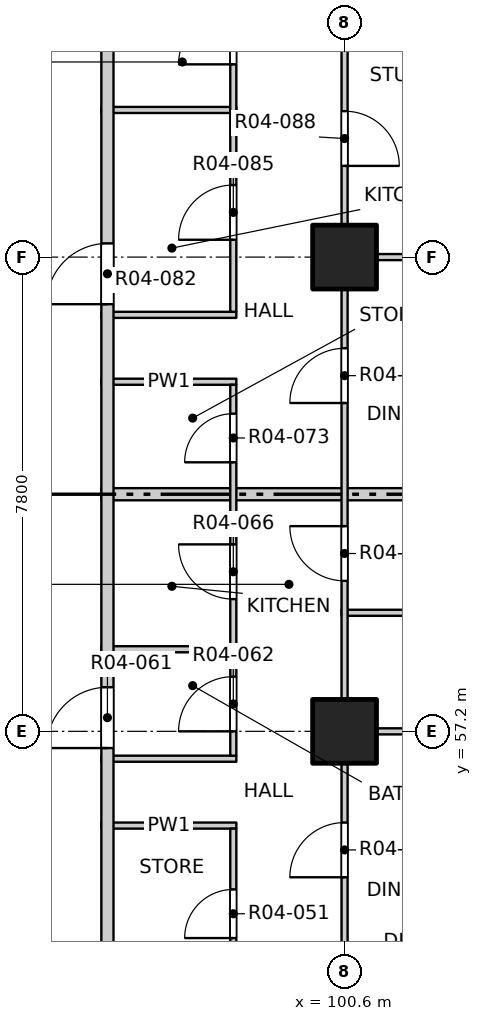
"""IFC4 building model, lengths in metres.
Left out: names, types, materials, properties, quantities, classifications, styles, units other than length and angle.
Written with IfcOpenShell. Run it as: python <this file> out.ifc"""

import sys

from ifc_helpers import new_model, si_unit, direction, frame, frame_2d, origin, origin_2d, place, context, subcontext, project, spatial, rectangle, extrude, element, fill, save


model = new_model("IFC4")
c1 = context("Model", 3, precision=1e-05, world=origin(), true_north=direction((0.0, 1.0)))
c2 = subcontext(c1, "Body", "Model", "MODEL_VIEW")
j1 = project(units=[si_unit("LENGTHUNIT", "METRE"), si_unit("PLANEANGLEUNIT", "RADIAN")], contexts=[c1])
p1 = place(None, origin())
s1 = spatial("IfcSite", under=j1, at=p1, CompositionType="ELEMENT")
p2 = place(p1, origin())
s2 = spatial("IfcBuilding", under=s1, at=p2, CompositionType="ELEMENT")
p3 = place(p2, frame((0.0, 0.0, 58.0)))
s3 = spatial("IfcBuildingStorey", under=s2, at=p3, CompositionType="ELEMENT", Elevation=58.0)
for number, where, z_axis, x_axis in (
    (1, (100.6, 57.2, -0.25), (0.0, 0.0, 1.0), (1.0, 0.0, 0.0)),
    (2, (100.6, 65.0, -0.25), (0.0, 0.0, 1.0), (1.0, 0.0, 0.0)),
):
    element("IfcColumn", number, at=place(p3, frame(where, z_axis=z_axis, x_axis=x_axis)), inside=s3, PredefinedType="COLUMN", context=c2, shape_type="SweptSolid", body=[
        extrude(rectangle(XDim=1.05, YDim=1.05, at=origin_2d()), origin(), (0.0, 0.0, 1.0), 3.4),
    ])
for number, where, z_axis, x_axis in (
    (3, (96.6, 55.65, 0.0), (0.0, 0.0, 1.0), (1.0, 0.0, 0.0)),
    (4, (96.6, 56.75, 0.0), (0.0, 0.0, 1.0), (1.0, 0.0, 0.0)),
):
    element("IfcWall", number, at=place(p3, frame(where, z_axis=z_axis, x_axis=x_axis)), inside=s3, PredefinedType="PARTITIONING", context=c2, shape_type="SweptSolid", body=[
        extrude(rectangle(XDim=2.22, YDim=0.1, at=frame_2d((1.11, 0.0))), origin(), (0.0, 0.0, 1.0), 3.15),
    ])
p4 = place(p3, frame((100.55, 57.2, 0.0), z_axis=(0.0, 0.0, 1.0), x_axis=(1.0, 0.0, 0.0)))
e5 = element("IfcWall", 5, at=p4, inside=s3, PredefinedType="PARTITIONING", context=c2, shape_type="SweptSolid", body=[
    extrude(rectangle(XDim=7.55, YDim=0.1, at=frame_2d((3.775, 0.0))), origin(), (0.0, 0.0, 1.0), 2.55),
])
p5 = place(p3, frame((96.6, 58.55, 0.0), z_axis=(0.0, 0.0, 1.0), x_axis=(1.0, 0.0, 0.0)))
e6 = element("IfcWall", 6, at=p5, inside=s3, PredefinedType="PARTITIONING", context=c2, shape_type="SweptSolid", body=[
    extrude(rectangle(XDim=2.22, YDim=0.1, at=frame_2d((1.11, 0.0))), origin(), (0.0, 0.0, 1.0), 3.15),
])
p6 = place(p3, frame((100.55, 59.15, 0.0), z_axis=(0.0, 0.0, 1.0), x_axis=(1.0, 0.0, 0.0)))
e7 = element("IfcWall", 7, at=p6, inside=s3, PredefinedType="PARTITIONING", context=c2, shape_type="SweptSolid", body=[
    extrude(rectangle(XDim=3.7, YDim=0.1, at=frame_2d((1.85, 0.0))), origin(), (0.0, 0.0, 1.0), 3.15),
])
p7 = place(p3, frame((96.6, 61.1, 0.0), z_axis=(0.0, 0.0, 1.0), x_axis=(1.0, 0.0, 0.0)))
e8 = element("IfcWall", 8, at=p7, inside=s3, PredefinedType="PARTITIONING", context=c2, shape_type="SweptSolid", body=[
    extrude(rectangle(XDim=11.5, YDim=0.2, at=frame_2d((5.75, 0.0))), origin(), (0.0, 0.0, 1.0), 3.15),
])
for number, where, z_axis, x_axis in (
    (9, (96.6, 62.95, 0.0), (0.0, 0.0, 1.0), (1.0, 0.0, 0.0)),
    (10, (96.6, 64.05, 0.0), (0.0, 0.0, 1.0), (1.0, 0.0, 0.0)),
):
    element("IfcWall", number, at=place(p3, frame(where, z_axis=z_axis, x_axis=x_axis)), inside=s3, PredefinedType="PARTITIONING", context=c2, shape_type="SweptSolid", body=[
        extrude(rectangle(XDim=2.22, YDim=0.1, at=frame_2d((1.11, 0.0))), origin(), (0.0, 0.0, 1.0), 3.15),
    ])
p8 = place(p3, frame((100.55, 65.0, 0.0), z_axis=(0.0, 0.0, 1.0), x_axis=(1.0, 0.0, 0.0)))
e11 = element("IfcWall", 11, at=p8, inside=s3, PredefinedType="PARTITIONING", context=c2, shape_type="SweptSolid", body=[
    extrude(rectangle(XDim=7.55, YDim=0.1, at=frame_2d((3.775, 0.0))), origin(), (0.0, 0.0, 1.0), 2.55),
])
p9 = place(p3, frame((96.6, 67.42, 0.0), z_axis=(0.0, 0.0, 1.0), x_axis=(1.0, 0.0, 0.0)))
e12 = element("IfcWall", 12, at=p9, inside=s3, PredefinedType="PARTITIONING", context=c2, shape_type="SweptSolid", body=[
    extrude(rectangle(XDim=2.22, YDim=0.1, at=frame_2d((1.11, 0.0))), origin(), (0.0, 0.0, 1.0), 3.15),
])
p10 = place(p3, frame((96.7, 53.4, 0.0), z_axis=(0.0, 0.0, 1.0), x_axis=(0.0, 1.0, 0.0)))
e13 = element("IfcWall", 13, at=p10, inside=s3, PredefinedType="PARTITIONING", context=c2, shape_type="SweptSolid", body=[
    extrude(rectangle(XDim=31.0, YDim=0.2, at=frame_2d((15.5, 0.0))), origin(), (0.0, 0.0, 1.0), 3.15),
])
p11 = place(p10, frame((3.525, 0.0, 0.0)))
e14 = element("IfcOpeningElement", 14, at=p11, cuts=e13, PredefinedType="OPENING", context=c2, shape_type="SweptSolid", body=[
    extrude(rectangle(XDim=1.0, YDim=2.1, at=frame_2d((0.5, 1.05))), frame((0.0, 0.11, 0.0), z_axis=(0.0, -1.0, 0.0), x_axis=(1.0, 0.0, 0.0)), (0.0, 0.0, 1.0), 0.22),
])
p12 = place(p10, frame((10.825, 0.0, 0.0)))
e15 = element("IfcOpeningElement", 15, at=p12, cuts=e13, PredefinedType="OPENING", context=c2, shape_type="SweptSolid", body=[
    extrude(rectangle(XDim=1.0, YDim=2.1, at=frame_2d((0.5, 1.05))), frame((0.0, 0.11, 0.0), z_axis=(0.0, -1.0, 0.0), x_axis=(1.0, 0.0, 0.0)), (0.0, 0.0, 1.0), 0.22),
])
p13 = place(p10, frame((25.975, 0.0, 0.0)))
e16 = element("IfcOpeningElement", 16, at=p13, cuts=e13, PredefinedType="OPENING", context=c2, shape_type="SweptSolid", body=[
    extrude(rectangle(XDim=1.0, YDim=2.1, at=frame_2d((0.5, 1.05))), frame((0.0, 0.11, 0.0), z_axis=(0.0, -1.0, 0.0), x_axis=(1.0, 0.0, 0.0)), (0.0, 0.0, 1.0), 0.22),
])
p14 = place(p3, frame((98.77, 45.55, 0.0), z_axis=(0.0, 0.0, 1.0), x_axis=(0.0, 1.0, 0.0)))
e17 = element("IfcWall", 17, at=p14, inside=s3, PredefinedType="PARTITIONING", context=c2, shape_type="SweptSolid", body=[
    extrude(rectangle(XDim=10.05, YDim=0.1, at=frame_2d((5.025, 0.0))), origin(), (0.0, 0.0, 1.0), 3.15),
])
p15 = place(p14, frame((0.4, 0.0, 0.0)))
e18 = element("IfcOpeningElement", 18, at=p15, cuts=e17, PredefinedType="OPENING", context=c2, shape_type="SweptSolid", body=[
    extrude(rectangle(XDim=0.9, YDim=2.1, at=frame_2d((0.45, 1.05))), frame((0.0, 0.06, 0.0), z_axis=(0.0, -1.0, 0.0), x_axis=(1.0, 0.0, 0.0)), (0.0, 0.0, 1.0), 0.12),
])
p16 = place(p14, frame((2.8, 0.0, 0.0)))
e19 = element("IfcOpeningElement", 19, at=p16, cuts=e17, PredefinedType="OPENING", context=c2, shape_type="SweptSolid", body=[
    extrude(rectangle(XDim=0.8, YDim=2.1, at=frame_2d((0.4, 1.05))), frame((0.0, 0.06, 0.0), z_axis=(0.0, -1.0, 0.0), x_axis=(1.0, 0.0, 0.0)), (0.0, 0.0, 1.0), 0.12),
])
p17 = place(p14, frame((5.525, 0.0, 0.0)))
e20 = element("IfcOpeningElement", 20, at=p17, cuts=e17, PredefinedType="OPENING", context=c2, shape_type="SweptSolid", body=[
    extrude(rectangle(XDim=0.8, YDim=2.1, at=frame_2d((0.4, 1.05))), frame((0.0, 0.06, 0.0), z_axis=(0.0, -1.0, 0.0), x_axis=(1.0, 0.0, 0.0)), (0.0, 0.0, 1.0), 0.12),
])
p18 = place(p14, frame((8.25, 0.0, 0.0)))
e21 = element("IfcOpeningElement", 21, at=p18, cuts=e17, PredefinedType="OPENING", context=c2, shape_type="SweptSolid", body=[
    extrude(rectangle(XDim=0.8, YDim=2.1, at=frame_2d((0.4, 1.05))), frame((0.0, 0.06, 0.0), z_axis=(0.0, -1.0, 0.0), x_axis=(1.0, 0.0, 0.0)), (0.0, 0.0, 1.0), 0.12),
])
p19 = place(p3, frame((98.77, 56.8, 0.0), z_axis=(0.0, 0.0, 1.0), x_axis=(0.0, 1.0, 0.0)))
e22 = element("IfcWall", 22, at=p19, inside=s3, PredefinedType="PARTITIONING", context=c2, shape_type="SweptSolid", body=[
    extrude(rectangle(XDim=6.1, YDim=0.1, at=frame_2d((3.05, 0.0))), origin(), (0.0, 0.0, 1.0), 3.15),
])
p20 = place(p19, frame((0.4, 0.0, 0.0)))
e23 = element("IfcOpeningElement", 23, at=p20, cuts=e22, PredefinedType="OPENING", context=c2, shape_type="SweptSolid", body=[
    extrude(rectangle(XDim=0.9, YDim=2.1, at=frame_2d((0.45, 1.05))), frame((0.0, 0.06, 0.0), z_axis=(0.0, -1.0, 0.0), x_axis=(1.0, 0.0, 0.0)), (0.0, 0.0, 1.0), 0.12),
])
p21 = place(p19, frame((2.575, 0.0, 0.0)))
e24 = element("IfcOpeningElement", 24, at=p21, cuts=e22, PredefinedType="OPENING", context=c2, shape_type="SweptSolid", body=[
    extrude(rectangle(XDim=0.9, YDim=2.1, at=frame_2d((0.45, 1.05))), frame((0.0, 0.06, 0.0), z_axis=(0.0, -1.0, 0.0), x_axis=(1.0, 0.0, 0.0)), (0.0, 0.0, 1.0), 0.12),
])
p22 = place(p19, frame((4.825, 0.0, 0.0)))
e25 = element("IfcOpeningElement", 25, at=p22, cuts=e22, PredefinedType="OPENING", context=c2, shape_type="SweptSolid", body=[
    extrude(rectangle(XDim=0.8, YDim=2.1, at=frame_2d((0.4, 1.05))), frame((0.0, 0.06, 0.0), z_axis=(0.0, -1.0, 0.0), x_axis=(1.0, 0.0, 0.0)), (0.0, 0.0, 1.0), 0.12),
])
p23 = place(p3, frame((98.77, 64.1, 0.0), z_axis=(0.0, 0.0, 1.0), x_axis=(0.0, 1.0, 0.0)))
e26 = element("IfcWall", 26, at=p23, inside=s3, PredefinedType="PARTITIONING", context=c2, shape_type="SweptSolid", body=[
    extrude(rectangle(XDim=13.95, YDim=0.1, at=frame_2d((6.975, 0.0))), origin(), (0.0, 0.0, 1.0), 3.15),
])
p24 = place(p23, frame((1.185, 0.0, 0.0)))
e27 = element("IfcOpeningElement", 27, at=p24, cuts=e26, PredefinedType="OPENING", context=c2, shape_type="SweptSolid", body=[
    extrude(rectangle(XDim=0.9, YDim=2.1, at=frame_2d((0.45, 1.05))), frame((0.0, 0.06, 0.0), z_axis=(0.0, -1.0, 0.0), x_axis=(1.0, 0.0, 0.0)), (0.0, 0.0, 1.0), 0.12),
])
p25 = place(p23, frame((4.07, 0.0, 0.0)))
e28 = element("IfcOpeningElement", 28, at=p25, cuts=e26, PredefinedType="OPENING", context=c2, shape_type="SweptSolid", body=[
    extrude(rectangle(XDim=0.9, YDim=2.1, at=frame_2d((0.45, 1.05))), frame((0.0, 0.06, 0.0), z_axis=(0.0, -1.0, 0.0), x_axis=(1.0, 0.0, 0.0)), (0.0, 0.0, 1.0), 0.12),
])
p26 = place(p23, frame((6.81, 0.0, 0.0)))
e29 = element("IfcOpeningElement", 29, at=p26, cuts=e26, PredefinedType="OPENING", context=c2, shape_type="SweptSolid", body=[
    extrude(rectangle(XDim=0.8, YDim=2.1, at=frame_2d((0.4, 1.05))), frame((0.0, 0.06, 0.0), z_axis=(0.0, -1.0, 0.0), x_axis=(1.0, 0.0, 0.0)), (0.0, 0.0, 1.0), 0.12),
])
p27 = place(p23, frame((9.71, 0.0, 0.0)))
e30 = element("IfcOpeningElement", 30, at=p27, cuts=e26, PredefinedType="OPENING", context=c2, shape_type="SweptSolid", body=[
    extrude(rectangle(XDim=0.9, YDim=2.1, at=frame_2d((0.45, 1.05))), frame((0.0, 0.06, 0.0), z_axis=(0.0, -1.0, 0.0), x_axis=(1.0, 0.0, 0.0)), (0.0, 0.0, 1.0), 0.12),
])
p28 = place(p23, frame((12.41, 0.0, 0.0)))
e31 = element("IfcOpeningElement", 31, at=p28, cuts=e26, PredefinedType="OPENING", context=c2, shape_type="SweptSolid", body=[
    extrude(rectangle(XDim=0.8, YDim=2.1, at=frame_2d((0.4, 1.05))), frame((0.0, 0.06, 0.0), z_axis=(0.0, -1.0, 0.0), x_axis=(1.0, 0.0, 0.0)), (0.0, 0.0, 1.0), 0.12),
])
p29 = place(p3, frame((100.6, 49.4, 0.0), z_axis=(0.0, 0.0, 1.0), x_axis=(0.0, 1.0, 0.0)))
e32 = element("IfcWall", 32, at=p29, inside=s3, PredefinedType="PARTITIONING", context=c2, shape_type="SweptSolid", body=[
    extrude(rectangle(XDim=31.2, YDim=0.1, at=frame_2d((15.6, 0.0))), origin(), (0.0, 0.0, 1.0), 3.15),
])
p30 = place(p29, frame((2.475, 0.0, 0.0)))
e33 = element("IfcOpeningElement", 33, at=p30, cuts=e32, PredefinedType="OPENING", context=c2, shape_type="SweptSolid", body=[
    extrude(rectangle(XDim=0.9, YDim=2.1, at=frame_2d((0.45, 1.05))), frame((0.0, 0.06, 0.0), z_axis=(0.0, -1.0, 0.0), x_axis=(1.0, 0.0, 0.0)), (0.0, 0.0, 1.0), 0.12),
])
p31 = place(p29, frame((5.4, 0.0, 0.0)))
e34 = element("IfcOpeningElement", 34, at=p31, cuts=e32, PredefinedType="OPENING", context=c2, shape_type="SweptSolid", body=[
    extrude(rectangle(XDim=0.9, YDim=2.1, at=frame_2d((0.45, 1.05))), frame((0.0, 0.06, 0.0), z_axis=(0.0, -1.0, 0.0), x_axis=(1.0, 0.0, 0.0)), (0.0, 0.0, 1.0), 0.12),
])
p32 = place(p29, frame((10.275, 0.0, 0.0)))
e35 = element("IfcOpeningElement", 35, at=p32, cuts=e32, PredefinedType="OPENING", context=c2, shape_type="SweptSolid", body=[
    extrude(rectangle(XDim=0.9, YDim=2.1, at=frame_2d((0.45, 1.05))), frame((0.0, 0.06, 0.0), z_axis=(0.0, -1.0, 0.0), x_axis=(1.0, 0.0, 0.0)), (0.0, 0.0, 1.0), 0.12),
])
p33 = place(p29, frame((13.2, 0.0, 0.0)))
e36 = element("IfcOpeningElement", 36, at=p33, cuts=e32, PredefinedType="OPENING", context=c2, shape_type="SweptSolid", body=[
    extrude(rectangle(XDim=0.9, YDim=2.1, at=frame_2d((0.45, 1.05))), frame((0.0, 0.06, 0.0), z_axis=(0.0, -1.0, 0.0), x_axis=(1.0, 0.0, 0.0)), (0.0, 0.0, 1.0), 0.12),
])
p34 = place(p29, frame((17.1, 0.0, 0.0)))
e37 = element("IfcOpeningElement", 37, at=p34, cuts=e32, PredefinedType="OPENING", context=c2, shape_type="SweptSolid", body=[
    extrude(rectangle(XDim=0.9, YDim=2.1, at=frame_2d((0.45, 1.05))), frame((0.0, 0.06, 0.0), z_axis=(0.0, -1.0, 0.0), x_axis=(1.0, 0.0, 0.0)), (0.0, 0.0, 1.0), 0.12),
])
p35 = place(p29, frame((21.8, 0.0, 0.0)))
e38 = element("IfcOpeningElement", 38, at=p35, cuts=e32, PredefinedType="OPENING", context=c2, shape_type="SweptSolid", body=[
    extrude(rectangle(XDim=0.9, YDim=2.1, at=frame_2d((0.45, 1.05))), frame((0.0, 0.06, 0.0), z_axis=(0.0, -1.0, 0.0), x_axis=(1.0, 0.0, 0.0)), (0.0, 0.0, 1.0), 0.12),
])
p36 = place(p29, frame((25.875, 0.0, 0.0)))
e39 = element("IfcOpeningElement", 39, at=p36, cuts=e32, PredefinedType="OPENING", context=c2, shape_type="SweptSolid", body=[
    extrude(rectangle(XDim=0.9, YDim=2.1, at=frame_2d((0.45, 1.05))), frame((0.0, 0.06, 0.0), z_axis=(0.0, -1.0, 0.0), x_axis=(1.0, 0.0, 0.0)), (0.0, 0.0, 1.0), 0.12),
])
p37 = place(p29, frame((28.8, 0.0, 0.0)))
e40 = element("IfcOpeningElement", 40, at=p37, cuts=e32, PredefinedType="OPENING", context=c2, shape_type="SweptSolid", body=[
    extrude(rectangle(XDim=0.9, YDim=2.1, at=frame_2d((0.45, 1.05))), frame((0.0, 0.06, 0.0), z_axis=(0.0, -1.0, 0.0), x_axis=(1.0, 0.0, 0.0)), (0.0, 0.0, 1.0), 0.12),
])
p38 = place(p18, origin())
e41 = element("IfcDoor", 41, at=p38, inside=s3, OperationType="SINGLE_SWING_LEFT", PredefinedType="DOOR", context=c2, shape_type="SweptSolid", body=[
    extrude(rectangle(XDim=0.8, YDim=2.1, at=frame_2d((0.4, 1.05))), frame((0.0, 0.025, 0.0), z_axis=(0.0, -1.0, 0.0), x_axis=(1.0, 0.0, 0.0)), (0.0, 0.0, 1.0), 0.05),
])
fill(e21, e41)
p39 = place(p31, origin())
e42 = element("IfcDoor", 42, at=p39, inside=s3, OperationType="SINGLE_SWING_LEFT", PredefinedType="DOOR", context=c2, shape_type="SweptSolid", body=[
    extrude(rectangle(XDim=0.9, YDim=2.1, at=frame_2d((0.45, 1.05))), frame((0.0, 0.025, 0.0), z_axis=(0.0, -1.0, 0.0), x_axis=(1.0, 0.0, 0.0)), (0.0, 0.0, 1.0), 0.05),
])
fill(e34, e42)
p40 = place(p11, origin())
e43 = element("IfcDoor", 43, at=p40, inside=s3, OperationType="SINGLE_SWING_LEFT", PredefinedType="DOOR", context=c2, shape_type="SweptSolid", body=[
    extrude(rectangle(XDim=1.0, YDim=2.1, at=frame_2d((0.5, 1.05))), frame((0.0, 0.025, 0.0), z_axis=(0.0, -1.0, 0.0), x_axis=(1.0, 0.0, 0.0)), (0.0, 0.0, 1.0), 0.05),
])
fill(e14, e43)
p41 = place(p20, origin())
e44 = element("IfcDoor", 44, at=p41, inside=s3, OperationType="SINGLE_SWING_LEFT", PredefinedType="DOOR", context=c2, shape_type="SweptSolid", body=[
    extrude(rectangle(XDim=0.9, YDim=2.1, at=frame_2d((0.45, 1.05))), frame((0.0, 0.025, 0.0), z_axis=(0.0, -1.0, 0.0), x_axis=(1.0, 0.0, 0.0)), (0.0, 0.0, 1.0), 0.05),
])
fill(e23, e44)
p42 = place(p21, origin())
e45 = element("IfcDoor", 45, at=p42, inside=s3, OperationType="SINGLE_SWING_RIGHT", PredefinedType="DOOR", context=c2, shape_type="SweptSolid", body=[
    extrude(rectangle(XDim=0.9, YDim=2.1, at=frame_2d((0.45, 1.05))), frame((0.0, 0.025, 0.0), z_axis=(0.0, -1.0, 0.0), x_axis=(1.0, 0.0, 0.0)), (0.0, 0.0, 1.0), 0.05),
])
fill(e24, e45)
p43 = place(p32, origin())
e46 = element("IfcDoor", 46, at=p43, inside=s3, OperationType="SINGLE_SWING_RIGHT", PredefinedType="DOOR", context=c2, shape_type="SweptSolid", body=[
    extrude(rectangle(XDim=0.9, YDim=2.1, at=frame_2d((0.45, 1.05))), frame((0.0, 0.025, 0.0), z_axis=(0.0, -1.0, 0.0), x_axis=(1.0, 0.0, 0.0)), (0.0, 0.0, 1.0), 0.05),
])
fill(e35, e46)
p44 = place(p22, origin())
e47 = element("IfcDoor", 47, at=p44, inside=s3, OperationType="SINGLE_SWING_LEFT", PredefinedType="DOOR", context=c2, shape_type="SweptSolid", body=[
    extrude(rectangle(XDim=0.8, YDim=2.1, at=frame_2d((0.4, 1.05))), frame((0.0, 0.025, 0.0), z_axis=(0.0, -1.0, 0.0), x_axis=(1.0, 0.0, 0.0)), (0.0, 0.0, 1.0), 0.05),
])
fill(e25, e47)
p45 = place(p33, origin())
e48 = element("IfcDoor", 48, at=p45, inside=s3, OperationType="SINGLE_SWING_LEFT", PredefinedType="DOOR", context=c2, shape_type="SweptSolid", body=[
    extrude(rectangle(XDim=0.9, YDim=2.1, at=frame_2d((0.45, 1.05))), frame((0.0, 0.025, 0.0), z_axis=(0.0, -1.0, 0.0), x_axis=(1.0, 0.0, 0.0)), (0.0, 0.0, 1.0), 0.05),
])
fill(e36, e48)
p46 = place(p12, origin())
e49 = element("IfcDoor", 49, at=p46, inside=s3, OperationType="SINGLE_SWING_LEFT", PredefinedType="DOOR", context=c2, shape_type="SweptSolid", body=[
    extrude(rectangle(XDim=1.0, YDim=2.1, at=frame_2d((0.5, 1.05))), frame((0.0, 0.025, 0.0), z_axis=(0.0, -1.0, 0.0), x_axis=(1.0, 0.0, 0.0)), (0.0, 0.0, 1.0), 0.05),
])
fill(e15, e49)
p47 = place(p24, origin())
e50 = element("IfcDoor", 50, at=p47, inside=s3, OperationType="SINGLE_SWING_LEFT", PredefinedType="DOOR", context=c2, shape_type="SweptSolid", body=[
    extrude(rectangle(XDim=0.9, YDim=2.1, at=frame_2d((0.45, 1.05))), frame((0.0, 0.025, 0.0), z_axis=(0.0, -1.0, 0.0), x_axis=(1.0, 0.0, 0.0)), (0.0, 0.0, 1.0), 0.05),
])
fill(e27, e50)
p48 = place(p34, origin())
e51 = element("IfcDoor", 51, at=p48, inside=s3, OperationType="SINGLE_SWING_RIGHT", PredefinedType="DOOR", context=c2, shape_type="SweptSolid", body=[
    extrude(rectangle(XDim=0.9, YDim=2.1, at=frame_2d((0.45, 1.05))), frame((0.0, 0.025, 0.0), z_axis=(0.0, -1.0, 0.0), x_axis=(1.0, 0.0, 0.0)), (0.0, 0.0, 1.0), 0.05),
])
fill(e37, e51)
p49 = place(p25, origin())
e52 = element("IfcDoor", 52, at=p49, inside=s3, OperationType="SINGLE_SWING_LEFT", PredefinedType="DOOR", context=c2, shape_type="SweptSolid", body=[
    extrude(rectangle(XDim=0.9, YDim=2.1, at=frame_2d((0.45, 1.05))), frame((0.0, 0.025, 0.0), z_axis=(0.0, -1.0, 0.0), x_axis=(1.0, 0.0, 0.0)), (0.0, 0.0, 1.0), 0.05),
])
fill(e28, e52)
save(model, sys.argv[1])
